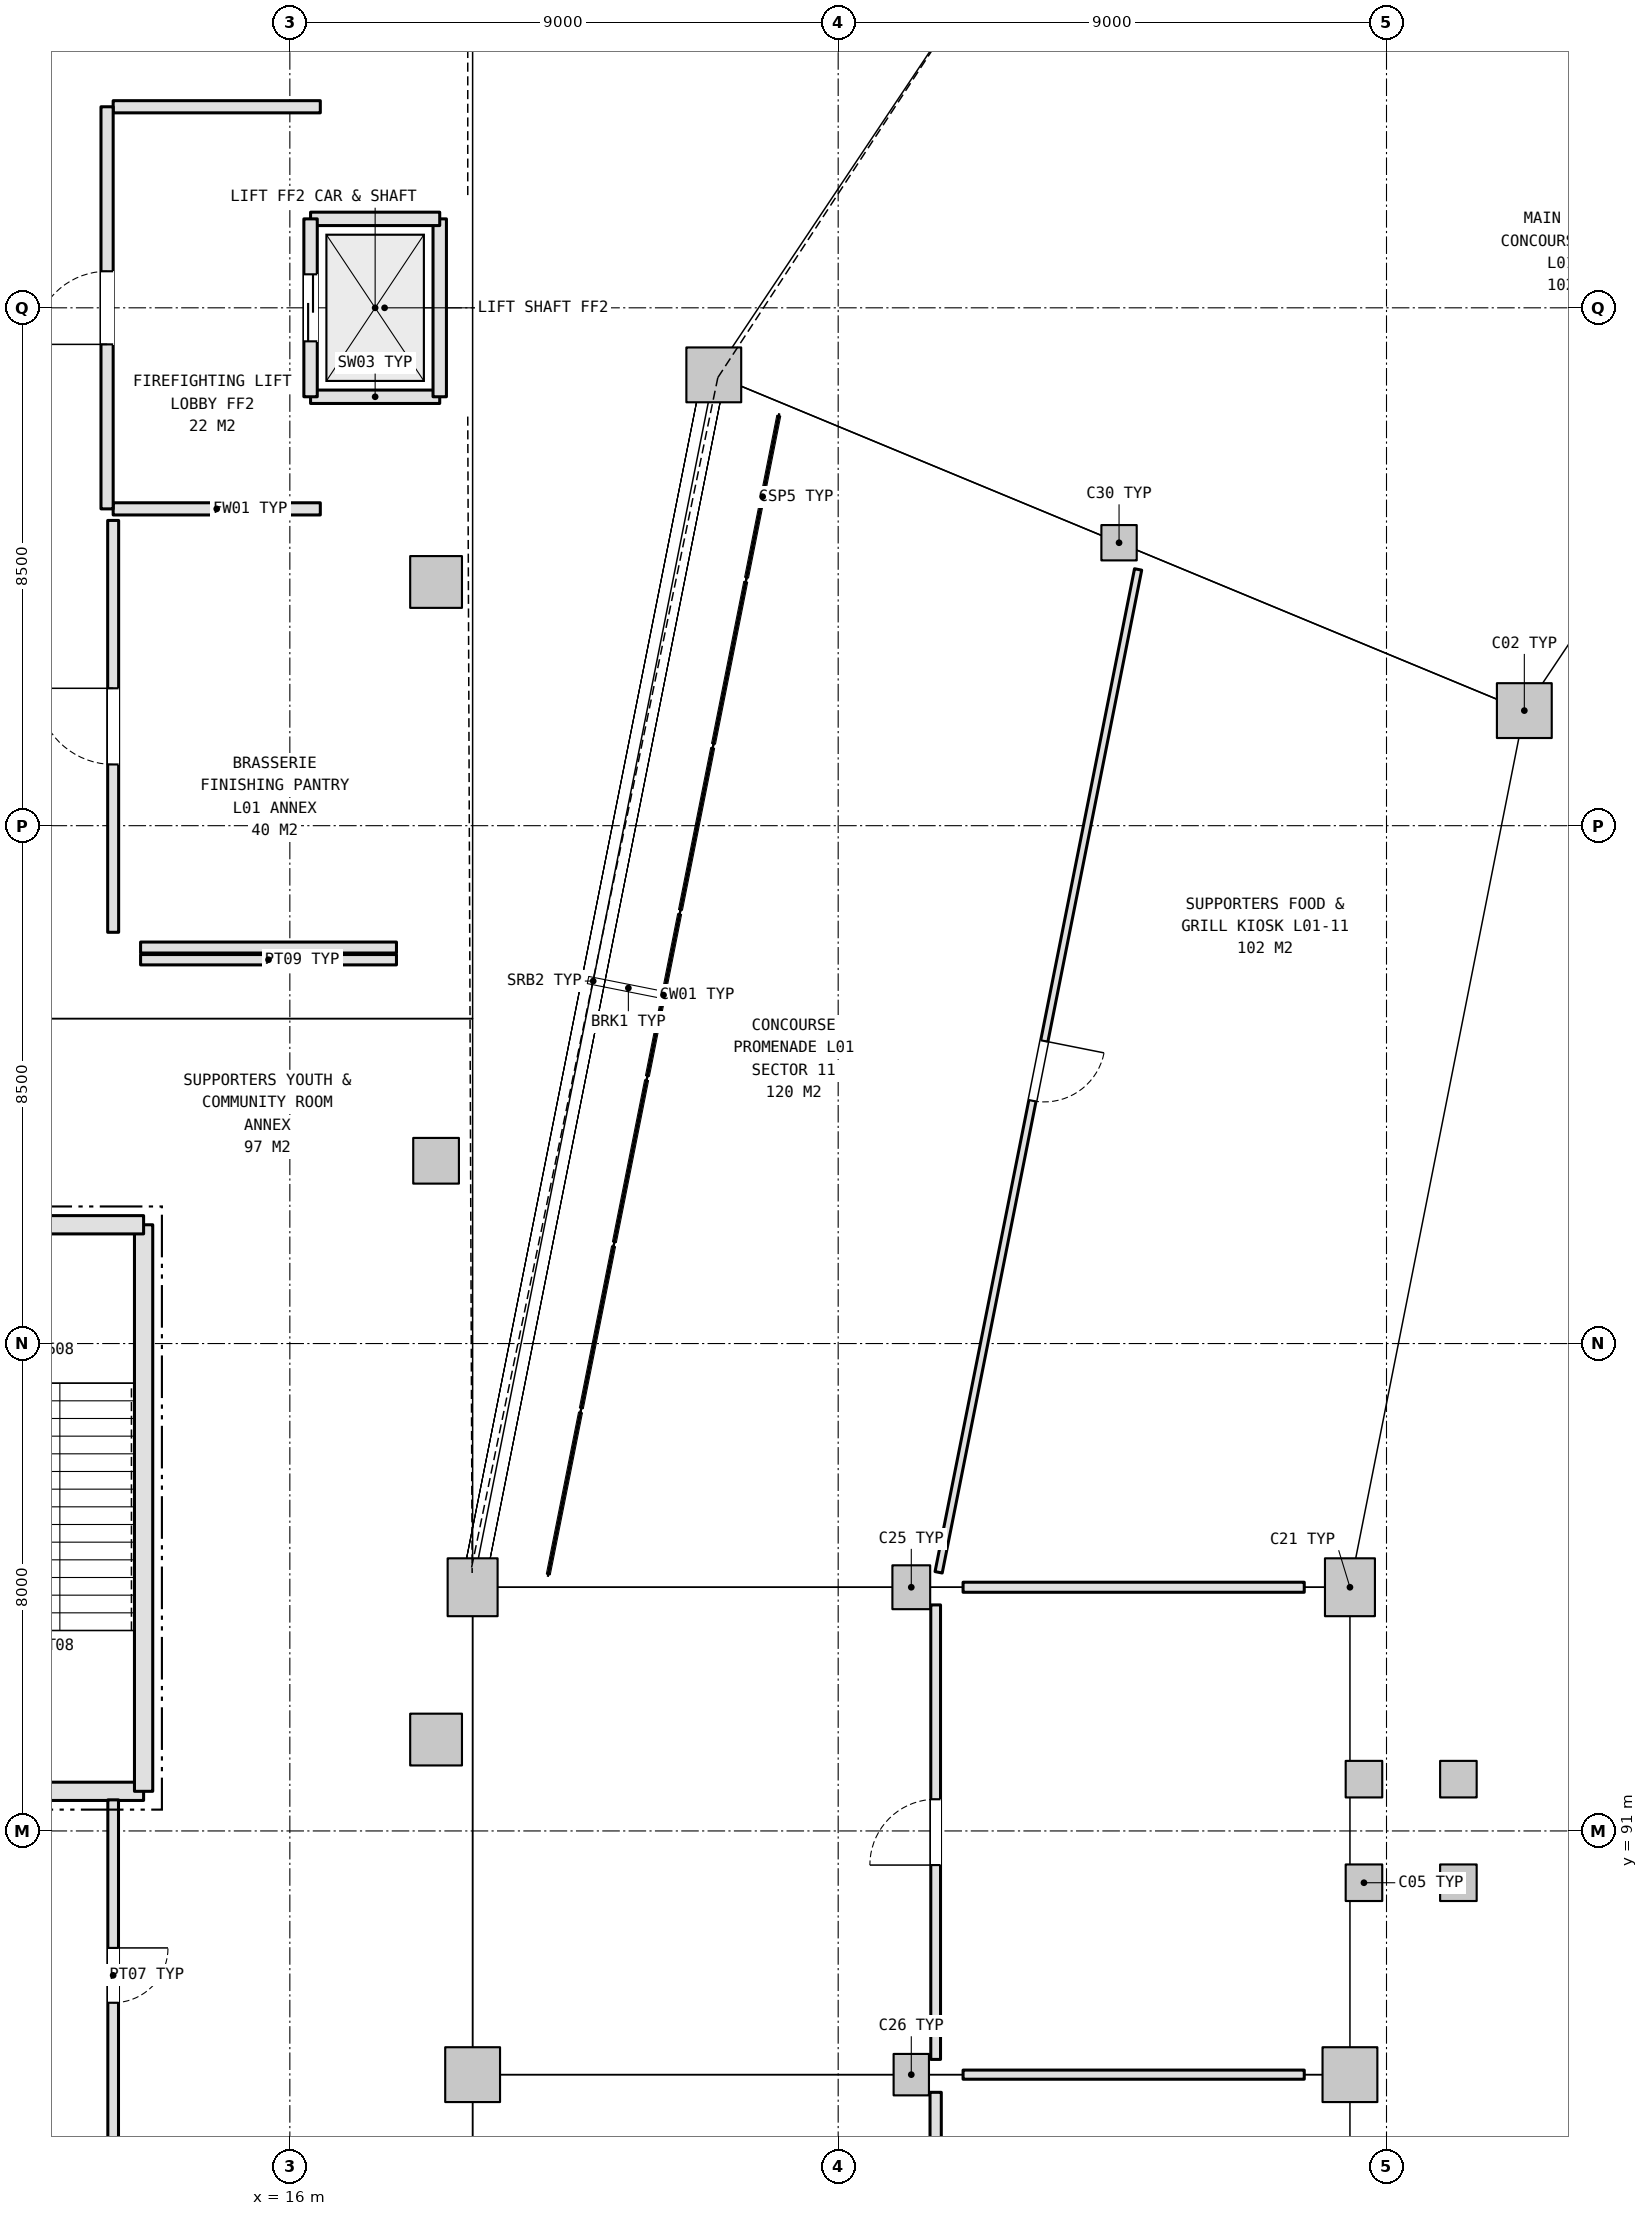
"""IFC4 building model, lengths in metres.
Left out: names, types, materials, properties, quantities, classifications, styles, units other than length and angle.
Written with IfcOpenShell. Run it as: python <this file> out.ifc"""

import sys

from ifc_helpers import new_model, si_unit, direction, frame, frame_2d, origin, origin_2d, place, context, subcontext, project, spatial, rectangle, extrude, element, fill, save


model = new_model("IFC4")
c1 = context("Model", 3, precision=1e-05, world=origin(), true_north=direction((0.0, 1.0)))
c2 = subcontext(c1, "Body", "Model", "MODEL_VIEW")
j1 = project(units=[si_unit("LENGTHUNIT", "METRE"), si_unit("PLANEANGLEUNIT", "RADIAN")], contexts=[c1])
p1 = place(None, origin())
s1 = spatial("IfcSite", under=j1, at=p1, CompositionType="ELEMENT")
p2 = place(p1, origin())
s2 = spatial("IfcBuilding", under=s1, at=p2, CompositionType="ELEMENT")
p3 = place(p2, frame((0.0, 0.0, 5.4)))
s3 = spatial("IfcBuildingStorey", under=s2, at=p3, CompositionType="ELEMENT", Elevation=5.4)
p4 = place(p3, frame((36.262, 109.389, 0.0), z_axis=(0.0, 0.0, 1.0), x_axis=(1.0, 0.0, 0.0)))
e1 = element("IfcColumn", 1, at=p4, inside=s3, PredefinedType="COLUMN", context=c2, shape_type="SweptSolid", body=[
    extrude(rectangle(XDim=0.9, YDim=0.9, at=origin_2d()), origin(), (0.0, 0.0, 1.0), 5.4),
])
p5 = place(p3, frame((29.61, 112.144, 0.0), z_axis=(0.0, 0.0, 1.0), x_axis=(1.0, 0.0, 0.0)))
e2 = element("IfcColumn", 2, at=p5, inside=s3, PredefinedType="COLUMN", context=c2, shape_type="SweptSolid", body=[
    extrude(rectangle(XDim=0.58, YDim=0.58, at=origin_2d()), origin(), (0.0, 0.0, 1.0), 5.4),
])
p6 = place(p3, frame((22.958, 114.9, 0.0), z_axis=(0.0, 0.0, 1.0), x_axis=(1.0, 0.0, 0.0)))
e3 = element("IfcColumn", 3, at=p6, inside=s3, PredefinedType="COLUMN", context=c2, shape_type="SweptSolid", body=[
    extrude(rectangle(XDim=0.9, YDim=0.9, at=origin_2d()), origin(), (0.0, 0.0, 1.0), 5.4),
])
p7 = place(p3, frame((33.4, 95.0, 0.0), z_axis=(0.0, 0.0, 1.0), x_axis=(1.0, 0.0, 0.0)))
e4 = element("IfcColumn", 4, at=p7, inside=s3, PredefinedType="COLUMN", context=c2, shape_type="SweptSolid", body=[
    extrude(rectangle(XDim=0.82, YDim=0.95, at=origin_2d()), origin(), (0.0, 0.0, 1.0), 5.4),
])
p8 = place(p3, frame((26.2, 95.0, 0.0), z_axis=(0.0, 0.0, 1.0), x_axis=(1.0, 0.0, 0.0)))
e5 = element("IfcColumn", 5, at=p8, inside=s3, PredefinedType="COLUMN", context=c2, shape_type="SweptSolid", body=[
    extrude(rectangle(XDim=0.62, YDim=0.72, at=origin_2d()), origin(), (0.0, 0.0, 1.0), 5.4),
])
p9 = place(p3, frame((19.0, 95.0, 0.0), z_axis=(0.0, 0.0, 1.0), x_axis=(1.0, 0.0, 0.0)))
e6 = element("IfcColumn", 6, at=p9, inside=s3, PredefinedType="COLUMN", context=c2, shape_type="SweptSolid", body=[
    extrude(rectangle(XDim=0.82, YDim=0.95, at=origin_2d()), origin(), (0.0, 0.0, 1.0), 5.4),
])
p10 = place(p3, frame((33.4, 87.0, 0.0), z_axis=(0.0, 0.0, 1.0), x_axis=(1.0, 0.0, 0.0)))
e7 = element("IfcColumn", 7, at=p10, inside=s3, PredefinedType="COLUMN", context=c2, shape_type="SweptSolid", body=[
    extrude(rectangle(XDim=0.9, YDim=0.9, at=origin_2d()), origin(), (0.0, 0.0, 1.0), 5.4),
])
p11 = place(p3, frame((26.2, 87.0, 0.0), z_axis=(0.0, 0.0, 1.0), x_axis=(1.0, 0.0, 0.0)))
e8 = element("IfcColumn", 8, at=p11, inside=s3, PredefinedType="COLUMN", context=c2, shape_type="SweptSolid", body=[
    extrude(rectangle(XDim=0.58, YDim=0.68, at=origin_2d()), origin(), (0.0, 0.0, 1.0), 5.4),
])
p12 = place(p3, frame((19.0, 87.0, 0.0), z_axis=(0.0, 0.0, 1.0), x_axis=(1.0, 0.0, 0.0)))
e9 = element("IfcColumn", 9, at=p12, inside=s3, PredefinedType="COLUMN", context=c2, shape_type="SweptSolid", body=[
    extrude(rectangle(XDim=0.9, YDim=0.9, at=origin_2d()), origin(), (0.0, 0.0, 1.0), 5.4),
])
p13 = place(p3, frame((18.4, 92.5, 0.0), z_axis=(0.0, 0.0, 1.0), x_axis=(1.0, 0.0, 0.0)))
e10 = element("IfcColumn", 10, at=p13, inside=s3, PredefinedType="COLUMN", context=c2, shape_type="SweptSolid", body=[
    extrude(rectangle(XDim=0.85, YDim=0.85, at=origin_2d()), origin(), (0.0, 0.0, 1.0), 5.4),
])
p14 = place(p3, frame((18.4, 102.0, 0.0), z_axis=(0.0, 0.0, 1.0), x_axis=(1.0, 0.0, 0.0)))
e11 = element("IfcColumn", 11, at=p14, inside=s3, PredefinedType="COLUMN", context=c2, shape_type="SweptSolid", body=[
    extrude(rectangle(XDim=0.75, YDim=0.75, at=origin_2d()), origin(), (0.0, 0.0, 1.0), 5.4),
])
p15 = place(p3, frame((18.4, 111.5, 0.0), z_axis=(0.0, 0.0, 1.0), x_axis=(1.0, 0.0, 0.0)))
e12 = element("IfcColumn", 12, at=p15, inside=s3, PredefinedType="COLUMN", context=c2, shape_type="SweptSolid", body=[
    extrude(rectangle(XDim=0.85, YDim=0.85, at=origin_2d()), origin(), (0.0, 0.0, 1.0), 5.4),
])
p16 = place(p3, frame((8.25, 91.65, 0.0), z_axis=(0.0, 0.0, 1.0), x_axis=(1.0, 0.0, 0.0)))
e13 = element("IfcWall", 13, at=p16, inside=s3, PredefinedType="SHEAR", context=c2, shape_type="SweptSolid", body=[
    extrude(rectangle(XDim=5.349, YDim=0.3, at=frame_2d((2.675, 0.0))), origin(), (0.0, 0.0, 1.0), 5.14),
])
p17 = place(p3, frame((13.6, 91.65, 0.0), z_axis=(0.0, 0.0, 1.0), x_axis=(0.0, 1.0, 0.0)))
e14 = element("IfcWall", 14, at=p17, inside=s3, PredefinedType="SHEAR", context=c2, shape_type="SweptSolid", body=[
    extrude(rectangle(XDim=9.299, YDim=0.3, at=frame_2d((4.65, 0.0))), origin(), (0.0, 0.0, 1.0), 5.14),
])
p18 = place(p3, frame((13.6, 100.95, 0.0), z_axis=(0.0, 0.0, 1.0), x_axis=(-1.0, 0.0, 0.0)))
e15 = element("IfcWall", 15, at=p18, inside=s3, PredefinedType="SHEAR", context=c2, shape_type="SweptSolid", body=[
    extrude(rectangle(XDim=5.349, YDim=0.3, at=frame_2d((2.675, 0.0))), origin(), (0.0, 0.0, 1.0), 5.14),
])
p19 = place(p18, frame((1.925, 0.0, 0.0)))
e16 = element("IfcOpeningElement", 16, at=p19, cuts=e15, PredefinedType="OPENING", context=c2, shape_type="SweptSolid", body=[
    extrude(rectangle(XDim=1.5, YDim=2.2, at=frame_2d((0.75, 1.1))), frame((0.0, 0.16, 0.0), z_axis=(0.0, -1.0, 0.0), x_axis=(1.0, 0.0, 0.0)), (0.0, 0.0, 1.0), 0.32),
])
for number, where, z_axis, x_axis in (
    (17, (33.63, 90.15, 0.0), (0.0, 0.0, 1.0), (1.0, 0.0, 0.0)),
    (18, (35.18, 90.15, 0.0), (0.0, 0.0, 1.0), (1.0, 0.0, 0.0)),
    (19, (35.18, 91.85, 0.0), (0.0, 0.0, 1.0), (1.0, 0.0, 0.0)),
    (20, (33.63, 91.85, 0.0), (0.0, 0.0, 1.0), (1.0, 0.0, 0.0)),
):
    element("IfcColumn", number, at=place(p3, frame(where, z_axis=z_axis, x_axis=x_axis)), inside=s3, PredefinedType="COLUMN", context=c2, shape_type="SweptSolid", body=[
        extrude(rectangle(XDim=0.6, YDim=0.6, at=origin_2d()), origin(), (0.0, 0.0, 1.0), 5.4),
    ])
p20 = place(p3, frame((16.34, 114.54, 0.0), z_axis=(0.0, 0.0, 1.0), x_axis=(1.0, 0.0, 0.0)))
e21 = element("IfcWall", 21, at=p20, inside=s3, PredefinedType="SHEAR", context=c2, shape_type="SweptSolid", body=[
    extrude(rectangle(XDim=2.12, YDim=0.22, at=frame_2d((1.06, 0.0))), origin(), (0.0, 0.0, 1.0), 5.14),
])
p21 = place(p3, frame((18.46, 114.54, 0.0), z_axis=(0.0, 0.0, 1.0), x_axis=(0.0, 1.0, 0.0)))
e22 = element("IfcWall", 22, at=p21, inside=s3, PredefinedType="SHEAR", context=c2, shape_type="SweptSolid", body=[
    extrude(rectangle(XDim=2.92, YDim=0.22, at=frame_2d((1.46, 0.0))), origin(), (0.0, 0.0, 1.0), 5.14),
])
p22 = place(p3, frame((18.46, 117.46, 0.0), z_axis=(0.0, 0.0, 1.0), x_axis=(-1.0, 0.0, 0.0)))
e23 = element("IfcWall", 23, at=p22, inside=s3, PredefinedType="SHEAR", context=c2, shape_type="SweptSolid", body=[
    extrude(rectangle(XDim=2.12, YDim=0.22, at=frame_2d((1.06, 0.0))), origin(), (0.0, 0.0, 1.0), 5.14),
])
p23 = place(p3, frame((16.34, 117.46, 0.0), z_axis=(0.0, 0.0, 1.0), x_axis=(0.0, -1.0, 0.0)))
e24 = element("IfcWall", 24, at=p23, inside=s3, PredefinedType="SHEAR", context=c2, shape_type="SweptSolid", body=[
    extrude(rectangle(XDim=2.92, YDim=0.22, at=frame_2d((1.46, 0.0))), origin(), (0.0, 0.0, 1.0), 5.14),
])
p24 = place(p23, frame((0.91, 0.0, 0.0)))
e25 = element("IfcOpeningElement", 25, at=p24, cuts=e24, PredefinedType="OPENING", context=c2, shape_type="SweptSolid", body=[
    extrude(rectangle(XDim=1.1, YDim=2.2, at=frame_2d((0.55, 1.1))), frame((0.0, 0.12, 0.0), z_axis=(0.0, -1.0, 0.0), x_axis=(1.0, 0.0, 0.0)), (0.0, 0.0, 1.0), 0.24),
])
for number, where, z_axis, x_axis in (
    (26, (13.1, 112.7, 0.0), (0.0, 0.0, 1.0), (1.0, 0.0, 0.0)),
    (27, (16.5, 119.3, 0.0), (0.0, 0.0, 1.0), (-1.0, 0.0, 0.0)),
):
    element("IfcWall", number, at=place(p3, frame(where, z_axis=z_axis, x_axis=x_axis)), inside=s3, PredefinedType="SOLIDWALL", context=c2, shape_type="SweptSolid", body=[
        extrude(rectangle(XDim=3.4, YDim=0.2, at=frame_2d((1.7, 0.0))), origin(), (0.0, 0.0, 1.0), 5.12),
    ])
p25 = place(p3, frame((13.0, 119.3, 0.0), z_axis=(0.0, 0.0, 1.0), x_axis=(0.0, -1.0, 0.0)))
e28 = element("IfcWall", 28, at=p25, inside=s3, PredefinedType="SOLIDWALL", context=c2, shape_type="SweptSolid", body=[
    extrude(rectangle(XDim=6.6, YDim=0.2, at=frame_2d((3.3, 0.0))), origin(), (0.0, 0.0, 1.0), 5.12),
])
p26 = place(p25, frame((2.7, 0.0, 0.0)))
e29 = element("IfcOpeningElement", 29, at=p26, cuts=e28, PredefinedType="OPENING", context=c2, shape_type="SweptSolid", body=[
    extrude(rectangle(XDim=1.2, YDim=2.2, at=frame_2d((0.6, 1.1))), frame((0.0, 0.11, 0.0), z_axis=(0.0, -1.0, 0.0), x_axis=(1.0, 0.0, 0.0)), (0.0, 0.0, 1.0), 0.22),
])
p27 = place(p3, frame((13.1, 85.75, 0.0), z_axis=(0.0, 0.0, 1.0), x_axis=(0.0, 1.0, 0.0)))
e30 = element("IfcWall", 30, at=p27, inside=s3, PredefinedType="PARTITIONING", context=c2, shape_type="SweptSolid", body=[
    extrude(rectangle(XDim=5.76, YDim=0.175, at=frame_2d((2.88, 0.0))), origin(), (0.0, 0.0, 1.0), 5.12),
])
p28 = place(p27, frame((2.43, 0.0, 0.0)))
e31 = element("IfcOpeningElement", 31, at=p28, cuts=e30, PredefinedType="OPENING", context=c2, shape_type="SweptSolid", body=[
    extrude(rectangle(XDim=0.9, YDim=2.1, at=frame_2d((0.45, 1.05))), frame((0.0, 0.097, 0.0), z_axis=(0.0, -1.0, 0.0), x_axis=(1.0, 0.0, 0.0)), (0.0, 0.0, 1.0), 0.195),
])
p29 = place(p3, frame((13.55, 105.3, 0.0), z_axis=(0.0, 0.0, 1.0), x_axis=(1.0, 0.0, 0.0)))
e32 = element("IfcWall", 32, at=p29, inside=s3, PredefinedType="PARTITIONING", context=c2, shape_type="SweptSolid", body=[
    extrude(rectangle(XDim=4.2, YDim=0.17, at=frame_2d((2.1, 0.0))), origin(), (0.0, 0.0, 1.0), 5.12),
])
p30 = place(p3, frame((13.1, 105.75, 0.0), z_axis=(0.0, 0.0, 1.0), x_axis=(0.0, 1.0, 0.0)))
e33 = element("IfcWall", 33, at=p30, inside=s3, PredefinedType="PARTITIONING", context=c2, shape_type="SweptSolid", body=[
    extrude(rectangle(XDim=6.76, YDim=0.18, at=frame_2d((3.38, 0.0))), origin(), (0.0, 0.0, 1.0), 4.668),
])
p31 = place(p30, frame((2.755, 0.0, 0.0)))
e34 = element("IfcOpeningElement", 34, at=p31, cuts=e33, PredefinedType="OPENING", context=c2, shape_type="SweptSolid", body=[
    extrude(rectangle(XDim=1.25, YDim=2.2, at=frame_2d((0.625, 1.1))), frame((0.0, 0.1, 0.0), z_axis=(0.0, -1.0, 0.0), x_axis=(1.0, 0.0, 0.0)), (0.0, 0.0, 1.0), 0.2),
])
p32 = place(p3, frame((17.75, 105.5, 0.0), z_axis=(0.0, 0.0, 1.0), x_axis=(-1.0, 0.0, 0.0)))
e35 = element("IfcWall", 35, at=p32, inside=s3, PredefinedType="PARTITIONING", context=c2, shape_type="SweptSolid", body=[
    extrude(rectangle(XDim=4.2, YDim=0.18, at=frame_2d((2.1, 0.0))), origin(), (0.0, 0.0, 1.0), 5.12),
])
p33 = place(p3, frame((26.649, 95.245, 0.0), z_axis=(0.0, 0.0, 1.0), x_axis=(0.195100557291, 0.980783244425, 0.0)))
e36 = element("IfcWall", 36, at=p33, inside=s3, PredefinedType="PARTITIONING", context=c2, shape_type="SweptSolid", body=[
    extrude(rectangle(XDim=16.783, YDim=0.12, at=frame_2d((8.392, 0.0))), origin(), (0.0, 0.0, 1.0), 4.305),
])
p34 = place(p33, frame((7.892, 0.0, 0.0)))
e37 = element("IfcOpeningElement", 37, at=p34, cuts=e36, PredefinedType="OPENING", context=c2, shape_type="SweptSolid", body=[
    extrude(rectangle(XDim=1.0, YDim=2.1, at=frame_2d((0.5, 1.05))), frame((0.0, 0.07, 0.0), z_axis=(0.0, -1.0, 0.0), x_axis=(1.0, 0.0, 0.0)), (0.0, 0.0, 1.0), 0.14),
])
p35 = place(p3, frame((32.65, 95.0, 0.0), z_axis=(0.0, 0.0, 1.0), x_axis=(-1.0, 0.0, 0.0)))
e38 = element("IfcWall", 38, at=p35, inside=s3, PredefinedType="PARTITIONING", context=c2, shape_type="SweptSolid", body=[
    extrude(rectangle(XDim=5.6, YDim=0.165, at=frame_2d((2.8, 0.0))), origin(), (0.0, 0.0, 1.0), 4.345),
])
p36 = place(p3, frame((26.6, 87.25, 0.0), z_axis=(0.0, 0.0, 1.0), x_axis=(0.0, 1.0, 0.0)))
e39 = element("IfcWall", 39, at=p36, inside=s3, PredefinedType="PARTITIONING", context=c2, shape_type="SweptSolid", body=[
    extrude(rectangle(XDim=7.46, YDim=0.16, at=frame_2d((3.73, 0.0))), origin(), (0.0, 0.0, 1.0), 4.345),
])
p37 = place(p36, frame((3.19, 0.0, 0.0)))
e40 = element("IfcOpeningElement", 40, at=p37, cuts=e39, PredefinedType="OPENING", context=c2, shape_type="SweptSolid", body=[
    extrude(rectangle(XDim=1.08, YDim=2.25, at=frame_2d((0.54, 1.125))), frame((0.0, 0.09, 0.0), z_axis=(0.0, -1.0, 0.0), x_axis=(1.0, 0.0, 0.0)), (0.0, 0.0, 1.0), 0.18),
])
p38 = place(p3, frame((32.65, 87.0, 0.0), z_axis=(0.0, 0.0, 1.0), x_axis=(-1.0, 0.0, 0.0)))
e41 = element("IfcWall", 41, at=p38, inside=s3, PredefinedType="PARTITIONING", context=c2, shape_type="SweptSolid", body=[
    extrude(rectangle(XDim=5.6, YDim=0.15, at=frame_2d((2.8, 0.0))), origin(), (0.0, 0.0, 1.0), 4.375),
])
p39 = place(p3, frame((26.6, 79.25, 0.0), z_axis=(0.0, 0.0, 1.0), x_axis=(0.0, 1.0, 0.0)))
e42 = element("IfcWall", 42, at=p39, inside=s3, PredefinedType="PARTITIONING", context=c2, shape_type="SweptSolid", body=[
    extrude(rectangle(XDim=7.46, YDim=0.185, at=frame_2d((3.73, 0.0))), origin(), (0.0, 0.0, 1.0), 4.375),
])
p40 = place(p39, frame((3.24, 0.0, 0.0)))
e43 = element("IfcOpeningElement", 43, at=p40, cuts=e42, PredefinedType="OPENING", context=c2, shape_type="SweptSolid", body=[
    extrude(rectangle(XDim=0.98, YDim=2.15, at=frame_2d((0.49, 1.075))), frame((0.0, 0.103, 0.0), z_axis=(0.0, -1.0, 0.0), x_axis=(1.0, 0.0, 0.0)), (0.0, 0.0, 1.0), 0.205),
])
p41 = place(p24, origin())
e44 = element("IfcDoor", 44, at=p41, inside=s3, OperationType="DOUBLE_DOOR_SLIDING", PredefinedType="DOOR", context=c2, shape_type="SweptSolid", body=[
    extrude(rectangle(XDim=1.1, YDim=2.2, at=frame_2d((0.55, 1.1))), frame((0.0, 0.025, 0.0), z_axis=(0.0, -1.0, 0.0), x_axis=(1.0, 0.0, 0.0)), (0.0, 0.0, 1.0), 0.05),
])
fill(e25, e44)
p42 = place(p26, frame((1.2, 0.0, 0.0), z_axis=(0.0, 0.0, 1.0), x_axis=(-1.0, 0.0, 0.0)))
e45 = element("IfcDoor", 45, at=p42, inside=s3, OperationType="SINGLE_SWING_RIGHT", PredefinedType="DOOR", context=c2, shape_type="SweptSolid", body=[
    extrude(rectangle(XDim=1.2, YDim=2.2, at=frame_2d((0.6, 1.1))), frame((0.0, 0.025, 0.0), z_axis=(0.0, -1.0, 0.0), x_axis=(1.0, 0.0, 0.0)), (0.0, 0.0, 1.0), 0.05),
])
fill(e29, e45)
p43 = place(p28, frame((0.9, 0.0, 0.0), z_axis=(0.0, 0.0, 1.0), x_axis=(-1.0, 0.0, 0.0)))
e46 = element("IfcDoor", 46, at=p43, inside=s3, OperationType="SINGLE_SWING_RIGHT", PredefinedType="DOOR", context=c2, shape_type="SweptSolid", body=[
    extrude(rectangle(XDim=0.9, YDim=2.1, at=frame_2d((0.45, 1.05))), frame((0.0, 0.025, 0.0), z_axis=(0.0, -1.0, 0.0), x_axis=(1.0, 0.0, 0.0)), (0.0, 0.0, 1.0), 0.05),
])
fill(e31, e46)
p44 = place(p31, origin())
e47 = element("IfcDoor", 47, at=p44, inside=s3, OperationType="SINGLE_SWING_RIGHT", PredefinedType="DOOR", context=c2, shape_type="SweptSolid", body=[
    extrude(rectangle(XDim=1.25, YDim=2.2, at=frame_2d((0.625, 1.1))), frame((0.0, 0.025, 0.0), z_axis=(0.0, -1.0, 0.0), x_axis=(1.0, 0.0, 0.0)), (0.0, 0.0, 1.0), 0.05),
])
fill(e34, e47)
p45 = place(p34, frame((1.0, 0.0, 0.0), z_axis=(0.0, 0.0, 1.0), x_axis=(-1.0, 0.0, 0.0)))
e48 = element("IfcDoor", 48, at=p45, inside=s3, OperationType="SINGLE_SWING_RIGHT", PredefinedType="DOOR", context=c2, shape_type="SweptSolid", body=[
    extrude(rectangle(XDim=1.0, YDim=2.1, at=frame_2d((0.5, 1.05))), frame((0.0, 0.025, 0.0), z_axis=(0.0, -1.0, 0.0), x_axis=(1.0, 0.0, 0.0)), (0.0, 0.0, 1.0), 0.05),
])
fill(e37, e48)
p46 = place(p37, origin())
e49 = element("IfcDoor", 49, at=p46, inside=s3, OperationType="SINGLE_SWING_LEFT", PredefinedType="DOOR", context=c2, shape_type="SweptSolid", body=[
    extrude(rectangle(XDim=1.08, YDim=2.25, at=frame_2d((0.54, 1.125))), frame((0.0, 0.025, 0.0), z_axis=(0.0, -1.0, 0.0), x_axis=(1.0, 0.0, 0.0)), (0.0, 0.0, 1.0), 0.05),
])
fill(e40, e49)
save(model, sys.argv[1])
